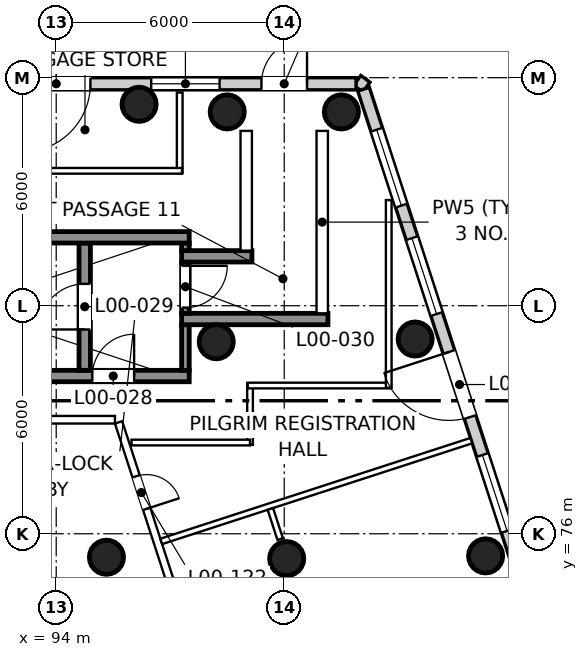
"""IFC4 building model, lengths in metres.
Left out: names, types, materials, properties, quantities, classifications, styles, units other than length and angle.
Written with IfcOpenShell. Run it as: python <this file> out.ifc"""

import sys

from ifc_helpers import new_model, si_unit, direction, frame, frame_2d, origin, origin_2d, place, context, subcontext, project, spatial, rectangle, circle, extrude, element, fill, save


model = new_model("IFC4")
c1 = context("Model", 3, precision=1e-05, world=origin(), true_north=direction((0.0, 1.0)))
c2 = subcontext(c1, "Body", "Model", "MODEL_VIEW")
j1 = project(units=[si_unit("LENGTHUNIT", "METRE"), si_unit("PLANEANGLEUNIT", "RADIAN")], contexts=[c1])
p1 = place(None, origin())
s1 = spatial("IfcSite", under=j1, at=p1, CompositionType="ELEMENT")
p2 = place(p1, origin())
s2 = spatial("IfcBuilding", under=s1, at=p2, CompositionType="ELEMENT")
p3 = place(p2, origin())
s3 = spatial("IfcBuildingStorey", under=s2, at=p3, CompositionType="ELEMENT", Elevation=0.0)
for number, where, z_axis, x_axis in (
    (1, (105.299, 75.418, 0.0), (0.0, 0.0, 1.0), (1.0, 0.0, 0.0)),
    (2, (103.445, 81.124, 0.0), (0.0, 0.0, 1.0), (1.0, 0.0, 0.0)),
    (3, (101.504, 87.1, 0.0), (0.0, 0.0, 1.0), (1.0, 0.0, 0.0)),
    (4, (98.5, 87.1, 0.0), (0.0, 0.0, 1.0), (1.0, 0.0, 0.0)),
    (5, (100.065, 75.346, 0.0), (0.0, 0.0, 1.0), (1.0, 0.0, 0.0)),
    (6, (98.211, 81.052, 0.0), (0.0, 0.0, 1.0), (1.0, 0.0, 0.0)),
    (7, (96.181, 87.3, 0.0), (0.0, 0.0, 1.0), (1.0, 0.0, 0.0)),
    (8, (95.322, 75.382, 0.0), (0.0, 0.0, 1.0), (1.0, 0.0, 0.0)),
):
    element("IfcColumn", number, at=place(p3, frame(where, z_axis=z_axis, x_axis=x_axis)), inside=s3, PredefinedType="COLUMN", context=c2, shape_type="SweptSolid", body=[
        extrude(circle(Radius=0.45, at=origin_2d()), origin(), (0.0, 0.0, 1.0), 9.0),
    ])
p4 = place(p3, frame((102.163, 87.752, 0.0), z_axis=(0.0, 0.0, 1.0), x_axis=(-0.809087927272, 0.587687609145, 0.0)))
e9 = element("IfcWall", 9, at=p4, inside=s3, PredefinedType="SOLIDWALL", context=c2, shape_type="SweptSolid", body=[
    extrude(rectangle(XDim=0.3, YDim=0.32, at=frame_2d((0.15, 0.0))), origin(), (0.0, 0.0, 1.0), 8.65),
])
p5 = place(p3, frame((110.912, 60.539, 0.0), z_axis=(0.0, 0.0, 1.0), x_axis=(-0.309016476183, 0.951056684666, 0.0)))
e10 = element("IfcWall", 10, at=p5, inside=s3, PredefinedType="SOLIDWALL", context=c2, shape_type="SweptSolid", body=[
    extrude(rectangle(XDim=28.556, YDim=0.32, at=frame_2d((14.278, 0.0))), origin(), (0.0, 0.0, 1.0), 8.65),
])
p6 = place(p5, frame((1.335, 0.0, 0.9)))
e11 = element("IfcOpeningElement", 11, at=p6, cuts=e10, PredefinedType="OPENING", context=c2, shape_type="SweptSolid", body=[
    extrude(rectangle(XDim=2.1, YDim=3.0, at=frame_2d((1.05, 1.5))), frame((0.0, 0.17, 0.0), z_axis=(0.0, -1.0, 0.0), x_axis=(1.0, 0.0, 0.0)), (0.0, 0.0, 1.0), 0.34),
])
p7 = place(p5, frame((4.335, 0.0, 0.9)))
e12 = element("IfcOpeningElement", 12, at=p7, cuts=e10, PredefinedType="OPENING", context=c2, shape_type="SweptSolid", body=[
    extrude(rectangle(XDim=2.1, YDim=3.0, at=frame_2d((1.05, 1.5))), frame((0.0, 0.17, 0.0), z_axis=(0.0, -1.0, 0.0), x_axis=(1.0, 0.0, 0.0)), (0.0, 0.0, 1.0), 0.34),
])
p8 = place(p5, frame((7.485, 0.0, 0.0)))
e13 = element("IfcOpeningElement", 13, at=p8, cuts=e10, PredefinedType="OPENING", context=c2, shape_type="SweptSolid", body=[
    extrude(rectangle(XDim=1.8, YDim=2.4, at=frame_2d((0.9, 1.2))), frame((0.0, 0.17, 0.0), z_axis=(0.0, -1.0, 0.0), x_axis=(1.0, 0.0, 0.0)), (0.0, 0.0, 1.0), 0.34),
])
p9 = place(p5, frame((10.335, 0.0, 0.9)))
e14 = element("IfcOpeningElement", 14, at=p9, cuts=e10, PredefinedType="OPENING", context=c2, shape_type="SweptSolid", body=[
    extrude(rectangle(XDim=2.1, YDim=3.0, at=frame_2d((1.05, 1.5))), frame((0.0, 0.17, 0.0), z_axis=(0.0, -1.0, 0.0), x_axis=(1.0, 0.0, 0.0)), (0.0, 0.0, 1.0), 0.34),
])
p10 = place(p5, frame((13.335, 0.0, 0.9)))
e15 = element("IfcOpeningElement", 15, at=p10, cuts=e10, PredefinedType="OPENING", context=c2, shape_type="SweptSolid", body=[
    extrude(rectangle(XDim=2.1, YDim=3.0, at=frame_2d((1.05, 1.5))), frame((0.0, 0.17, 0.0), z_axis=(0.0, -1.0, 0.0), x_axis=(1.0, 0.0, 0.0)), (0.0, 0.0, 1.0), 0.34),
])
p11 = place(p5, frame((16.335, 0.0, 0.9)))
e16 = element("IfcOpeningElement", 16, at=p11, cuts=e10, PredefinedType="OPENING", context=c2, shape_type="SweptSolid", body=[
    extrude(rectangle(XDim=2.1, YDim=3.0, at=frame_2d((1.05, 1.5))), frame((0.0, 0.17, 0.0), z_axis=(0.0, -1.0, 0.0), x_axis=(1.0, 0.0, 0.0)), (0.0, 0.0, 1.0), 0.34),
])
p12 = place(p5, frame((19.485, 0.0, 0.0)))
e17 = element("IfcOpeningElement", 17, at=p12, cuts=e10, PredefinedType="OPENING", context=c2, shape_type="SweptSolid", body=[
    extrude(rectangle(XDim=1.8, YDim=2.4, at=frame_2d((0.9, 1.2))), frame((0.0, 0.17, 0.0), z_axis=(0.0, -1.0, 0.0), x_axis=(1.0, 0.0, 0.0)), (0.0, 0.0, 1.0), 0.34),
])
p13 = place(p5, frame((22.335, 0.0, 0.9)))
e18 = element("IfcOpeningElement", 18, at=p13, cuts=e10, PredefinedType="OPENING", context=c2, shape_type="SweptSolid", body=[
    extrude(rectangle(XDim=2.1, YDim=3.0, at=frame_2d((1.05, 1.5))), frame((0.0, 0.17, 0.0), z_axis=(0.0, -1.0, 0.0), x_axis=(1.0, 0.0, 0.0)), (0.0, 0.0, 1.0), 0.34),
])
p14 = place(p5, frame((25.335, 0.0, 0.9)))
e19 = element("IfcOpeningElement", 19, at=p14, cuts=e10, PredefinedType="OPENING", context=c2, shape_type="SweptSolid", body=[
    extrude(rectangle(XDim=2.1, YDim=3.0, at=frame_2d((1.05, 1.5))), frame((0.0, 0.17, 0.0), z_axis=(0.0, -1.0, 0.0), x_axis=(1.0, 0.0, 0.0)), (0.0, 0.0, 1.0), 0.34),
])
p15 = place(p3, frame((101.891, 87.84, 0.0), z_axis=(0.0, 0.0, 1.0), x_axis=(-1.0, 0.0, 0.0)))
e20 = element("IfcWall", 20, at=p15, inside=s3, PredefinedType="SOLIDWALL", context=c2, shape_type="SweptSolid", body=[
    extrude(rectangle(XDim=20.891, YDim=0.32, at=frame_2d((10.446, 0.0))), origin(), (0.0, 0.0, 1.0), 8.65),
])
p16 = place(p15, frame((3.591, 0.0, 0.9)))
e21 = element("IfcOpeningElement", 21, at=p16, cuts=e20, PredefinedType="OPENING", context=c2, shape_type="SweptSolid", body=[
    extrude(rectangle(XDim=1.8, YDim=2.1, at=frame_2d((0.9, 1.05))), frame((0.0, 0.17, 0.0), z_axis=(0.0, -1.0, 0.0), x_axis=(1.0, 0.0, 0.0)), (0.0, 0.0, 1.0), 0.34),
])
p17 = place(p15, frame((6.991, 0.0, 0.0)))
e22 = element("IfcOpeningElement", 22, at=p17, cuts=e20, PredefinedType="OPENING", context=c2, shape_type="SweptSolid", body=[
    extrude(rectangle(XDim=1.8, YDim=2.7, at=frame_2d((0.9, 1.35))), frame((0.0, 0.17, 0.0), z_axis=(0.0, -1.0, 0.0), x_axis=(1.0, 0.0, 0.0)), (0.0, 0.0, 1.0), 0.34),
])
p18 = place(p15, frame((9.991, 0.0, 0.9)))
e23 = element("IfcOpeningElement", 23, at=p18, cuts=e20, PredefinedType="OPENING", context=c2, shape_type="SweptSolid", body=[
    extrude(rectangle(XDim=1.8, YDim=2.1, at=frame_2d((0.9, 1.05))), frame((0.0, 0.17, 0.0), z_axis=(0.0, -1.0, 0.0), x_axis=(1.0, 0.0, 0.0)), (0.0, 0.0, 1.0), 0.34),
])
p19 = place(p15, frame((12.991, 0.0, 0.9)))
e24 = element("IfcOpeningElement", 24, at=p19, cuts=e20, PredefinedType="OPENING", context=c2, shape_type="SweptSolid", body=[
    extrude(rectangle(XDim=1.8, YDim=2.1, at=frame_2d((0.9, 1.05))), frame((0.0, 0.17, 0.0), z_axis=(0.0, -1.0, 0.0), x_axis=(1.0, 0.0, 0.0)), (0.0, 0.0, 1.0), 0.34),
])
p20 = place(p15, frame((15.991, 0.0, 0.9)))
e25 = element("IfcOpeningElement", 25, at=p20, cuts=e20, PredefinedType="OPENING", context=c2, shape_type="SweptSolid", body=[
    extrude(rectangle(XDim=1.8, YDim=2.1, at=frame_2d((0.9, 1.05))), frame((0.0, 0.17, 0.0), z_axis=(0.0, -1.0, 0.0), x_axis=(1.0, 0.0, 0.0)), (0.0, 0.0, 1.0), 0.34),
])
p21 = place(p15, frame((1.291, 0.0, 0.0)))
e26 = element("IfcOpeningElement", 26, at=p21, cuts=e20, PredefinedType="OPENING", context=c2, shape_type="SweptSolid", body=[
    extrude(rectangle(XDim=1.2, YDim=2.1, at=frame_2d((0.6, 1.05))), frame((0.0, 0.17, 0.0), z_axis=(0.0, -1.0, 0.0), x_axis=(1.0, 0.0, 0.0)), (0.0, 0.0, 1.0), 0.34),
])
p22 = place(p3, frame((85.6, 80.15, 0.0), z_axis=(0.0, 0.0, 1.0), x_axis=(1.0, 0.0, 0.0)))
e27 = element("IfcWall", 27, at=p22, inside=s3, PredefinedType="SHEAR", context=c2, shape_type="SweptSolid", body=[
    extrude(rectangle(XDim=11.9, YDim=0.3, at=frame_2d((5.95, 0.0))), origin(), (0.0, 0.0, 1.0), 9.0),
])
p23 = place(p22, frame((9.35, 0.0, 0.0)))
e28 = element("IfcOpeningElement", 28, at=p23, cuts=e27, PredefinedType="OPENING", context=c2, shape_type="SweptSolid", body=[
    extrude(rectangle(XDim=1.1, YDim=2.1, at=frame_2d((0.55, 1.05))), frame((0.0, 0.16, 0.0), z_axis=(0.0, -1.0, 0.0), x_axis=(1.0, 0.0, 0.0)), (0.0, 0.0, 1.0), 0.32),
])
p24 = place(p3, frame((94.75, 80.3, 0.0), z_axis=(0.0, 0.0, 1.0), x_axis=(0.0, 1.0, 0.0)))
e29 = element("IfcWall", 29, at=p24, inside=s3, PredefinedType="SHEAR", context=c2, shape_type="SweptSolid", body=[
    extrude(rectangle(XDim=3.35, YDim=0.3, at=frame_2d((1.675, 0.0))), origin(), (0.0, 0.0, 1.0), 9.0),
])
p25 = place(p24, frame((1.075, 0.0, 0.0)))
e30 = element("IfcOpeningElement", 30, at=p25, cuts=e29, PredefinedType="OPENING", context=c2, shape_type="SweptSolid", body=[
    extrude(rectangle(XDim=1.2, YDim=2.1, at=frame_2d((0.6, 1.05))), frame((0.0, 0.16, 0.0), z_axis=(0.0, -1.0, 0.0), x_axis=(1.0, 0.0, 0.0)), (0.0, 0.0, 1.0), 0.32),
])
p26 = place(p3, frame((97.4, 80.3, 0.0), z_axis=(0.0, 0.0, 1.0), x_axis=(0.0, 1.0, 0.0)))
e31 = element("IfcWall", 31, at=p26, inside=s3, PredefinedType="SHEAR", context=c2, shape_type="SweptSolid", body=[
    extrude(rectangle(XDim=1.2, YDim=0.2, at=frame_2d((0.6, 0.0))), origin(), (0.0, 0.0, 1.0), 9.0),
])
p27 = place(p3, frame((97.3, 81.65, 0.0), z_axis=(0.0, 0.0, 1.0), x_axis=(1.0, 0.0, 0.0)))
e32 = element("IfcWall", 32, at=p27, inside=s3, PredefinedType="SHEAR", context=c2, shape_type="SweptSolid", body=[
    extrude(rectangle(XDim=3.85, YDim=0.3, at=frame_2d((1.925, 0.0))), origin(), (0.0, 0.0, 1.0), 9.0),
])
p28 = place(p3, frame((97.4, 81.8, 0.0), z_axis=(0.0, 0.0, 1.0), x_axis=(0.0, 1.0, 0.0)))
e33 = element("IfcWall", 33, at=p28, inside=s3, PredefinedType="SHEAR", context=c2, shape_type="SweptSolid", body=[
    extrude(rectangle(XDim=1.35, YDim=0.2, at=frame_2d((0.675, 0.0))), origin(), (0.0, 0.0, 1.0), 9.0),
])
p29 = place(p28, frame((0.15, 0.0, 0.0)))
e34 = element("IfcOpeningElement", 34, at=p29, cuts=e33, PredefinedType="OPENING", context=c2, shape_type="SweptSolid", body=[
    extrude(rectangle(XDim=1.1, YDim=2.1, at=frame_2d((0.55, 1.05))), frame((0.0, 0.11, 0.0), z_axis=(0.0, -1.0, 0.0), x_axis=(1.0, 0.0, 0.0)), (0.0, 0.0, 1.0), 0.22),
])
p30 = place(p3, frame((101.0, 81.8, 0.0), z_axis=(0.0, 0.0, 1.0), x_axis=(0.0, 1.0, 0.0)))
e35 = element("IfcWall", 35, at=p30, inside=s3, PredefinedType="PARTITIONING", context=c2, shape_type="SweptSolid", body=[
    extrude(rectangle(XDim=4.8, YDim=0.3, at=frame_2d((2.4, 0.0))), origin(), (0.0, 0.0, 1.0), 8.65),
])
p31 = place(p3, frame((97.3, 83.3, 0.0), z_axis=(0.0, 0.0, 1.0), x_axis=(1.0, 0.0, 0.0)))
e36 = element("IfcWall", 36, at=p31, inside=s3, PredefinedType="SHEAR", context=c2, shape_type="SweptSolid", body=[
    extrude(rectangle(XDim=1.85, YDim=0.3, at=frame_2d((0.925, 0.0))), origin(), (0.0, 0.0, 1.0), 9.0),
])
p32 = place(p3, frame((97.3, 83.55, 0.0), z_axis=(0.0, 0.0, 1.0), x_axis=(1.0, 0.0, 0.0)))
e37 = element("IfcWall", 37, at=p32, inside=s3, PredefinedType="SHEAR", context=c2, shape_type="SweptSolid", body=[
    extrude(rectangle(XDim=0.2, YDim=0.2, at=frame_2d((0.1, 0.0))), origin(), (0.0, 0.0, 1.0), 9.0),
])
p33 = place(p3, frame((99.0, 83.45, 0.0), z_axis=(0.0, 0.0, 1.0), x_axis=(0.0, 1.0, 0.0)))
e38 = element("IfcWall", 38, at=p33, inside=s3, PredefinedType="PARTITIONING", context=c2, shape_type="SweptSolid", body=[
    extrude(rectangle(XDim=3.15, YDim=0.3, at=frame_2d((1.575, 0.0))), origin(), (0.0, 0.0, 1.0), 8.65),
])
p34 = place(p3, frame((85.6, 83.8, 0.0), z_axis=(0.0, 0.0, 1.0), x_axis=(1.0, 0.0, 0.0)))
e39 = element("IfcWall", 39, at=p34, inside=s3, PredefinedType="SHEAR", context=c2, shape_type="SweptSolid", body=[
    extrude(rectangle(XDim=11.9, YDim=0.3, at=frame_2d((5.95, 0.0))), origin(), (0.0, 0.0, 1.0), 9.0),
])
p35 = place(p3, frame((83.2, 79.0, 0.0), z_axis=(0.0, 0.0, 1.0), x_axis=(1.0, 0.0, 0.0)))
e40 = element("IfcWall", 40, at=p35, inside=s3, PredefinedType="PARTITIONING", context=c2, shape_type="SweptSolid", body=[
    extrude(rectangle(XDim=12.346, YDim=0.2, at=frame_2d((6.173, 0.0))), origin(), (0.0, 0.0, 1.0), 7.95),
])
p36 = place(p3, frame((95.641, 78.931, 0.0), z_axis=(0.0, 0.0, 1.0), x_axis=(0.309013160516, -0.951057761983, 0.0)))
e41 = element("IfcWall", 41, at=p36, inside=s3, PredefinedType="PARTITIONING", context=c2, shape_type="SweptSolid", body=[
    extrude(rectangle(XDim=17.717, YDim=0.2, at=frame_2d((8.859, 0.0))), origin(), (0.0, 0.0, 1.0), 8.65),
])
p37 = place(p36, frame((13.799, 0.0, 0.0)))
e42 = element("IfcOpeningElement", 42, at=p37, cuts=e41, PredefinedType="OPENING", context=c2, shape_type="SweptSolid", body=[
    extrude(rectangle(XDim=0.9, YDim=2.1, at=frame_2d((0.45, 1.05))), frame((0.0, 0.11, 0.0), z_axis=(0.0, -1.0, 0.0), x_axis=(1.0, 0.0, 0.0)), (0.0, 0.0, 1.0), 0.22),
])
p38 = place(p36, frame((10.375, 0.0, 0.0)))
e43 = element("IfcOpeningElement", 43, at=p38, cuts=e41, PredefinedType="OPENING", context=c2, shape_type="SweptSolid", body=[
    extrude(rectangle(XDim=0.9, YDim=2.1, at=frame_2d((0.45, 1.05))), frame((0.0, 0.11, 0.0), z_axis=(0.0, -1.0, 0.0), x_axis=(1.0, 0.0, 0.0)), (0.0, 0.0, 1.0), 0.22),
])
p39 = place(p36, frame((5.875, 0.0, 0.0)))
e44 = element("IfcOpeningElement", 44, at=p39, cuts=e41, PredefinedType="OPENING", context=c2, shape_type="SweptSolid", body=[
    extrude(rectangle(XDim=0.9, YDim=2.1, at=frame_2d((0.45, 1.05))), frame((0.0, 0.11, 0.0), z_axis=(0.0, -1.0, 0.0), x_axis=(1.0, 0.0, 0.0)), (0.0, 0.0, 1.0), 0.22),
])
p40 = place(p36, frame((1.492, 0.0, 0.0)))
e45 = element("IfcOpeningElement", 45, at=p40, cuts=e41, PredefinedType="OPENING", context=c2, shape_type="SweptSolid", body=[
    extrude(rectangle(XDim=0.9, YDim=2.1, at=frame_2d((0.45, 1.05))), frame((0.0, 0.11, 0.0), z_axis=(0.0, -1.0, 0.0), x_axis=(1.0, 0.0, 0.0)), (0.0, 0.0, 1.0), 0.22),
])
p41 = place(p3, frame((104.924, 78.45, 0.0), z_axis=(0.0, 0.0, 1.0), x_axis=(-0.951054768527, -0.309022373402, 0.0)))
e46 = element("IfcWall", 46, at=p41, inside=s3, PredefinedType="PARTITIONING", context=c2, shape_type="SweptSolid", body=[
    extrude(rectangle(XDim=8.58, YDim=0.15, at=frame_2d((4.29, 0.0))), origin(), (0.0, 0.0, 1.0), 7.95),
])
p42 = place(p3, frame((99.894, 75.858, 0.0), z_axis=(0.0, 0.0, 1.0), x_axis=(-0.308947409325, 0.951079123034, 0.0)))
e47 = element("IfcWall", 47, at=p42, inside=s3, PredefinedType="PARTITIONING", context=c2, shape_type="SweptSolid", body=[
    extrude(rectangle(XDim=0.836, YDim=0.15, at=frame_2d((0.418, 0.0))), origin(), (0.0, 0.0, 1.0), 7.95),
])
p43 = place(p3, frame((97.25, 87.61, 0.0), z_axis=(0.0, 0.0, 1.0), x_axis=(0.0, -1.0, 0.0)))
e48 = element("IfcWall", 48, at=p43, inside=s3, PredefinedType="PARTITIONING", context=c2, shape_type="SweptSolid", body=[
    extrude(rectangle(XDim=2.12, YDim=0.15, at=frame_2d((1.06, 0.0))), origin(), (0.0, 0.0, 1.0), 8.65),
])
p44 = place(p3, frame((97.31, 85.55, 0.0), z_axis=(0.0, 0.0, 1.0), x_axis=(-1.0, 0.0, 0.0)))
e49 = element("IfcWall", 49, at=p44, inside=s3, PredefinedType="PARTITIONING", context=c2, shape_type="SweptSolid", body=[
    extrude(rectangle(XDim=13.37, YDim=0.15, at=frame_2d((6.685, 0.0))), origin(), (0.0, 0.0, 1.0), 7.95),
])
p45 = place(p3, frame((99.1, 78.34, 0.0), z_axis=(0.0, 0.0, 1.0), x_axis=(0.0, 1.0, 0.0)))
e50 = element("IfcWall", 50, at=p45, inside=s3, PredefinedType="PARTITIONING", context=c2, shape_type="SweptSolid", body=[
    extrude(rectangle(XDim=1.62, YDim=0.15, at=frame_2d((0.81, 0.0))), origin(), (0.0, 0.0, 1.0), 7.95),
])
p46 = place(p3, frame((99.04, 79.9, 0.0), z_axis=(0.0, 0.0, 1.0), x_axis=(1.0, 0.0, 0.0)))
e51 = element("IfcWall", 51, at=p46, inside=s3, PredefinedType="PARTITIONING", context=c2, shape_type="SweptSolid", body=[
    extrude(rectangle(XDim=3.77, YDim=0.15, at=frame_2d((1.885, 0.0))), origin(), (0.0, 0.0, 1.0), 8.65),
])
p47 = place(p3, frame((102.75, 79.84, 0.0), z_axis=(0.0, 0.0, 1.0), x_axis=(0.0, 1.0, 0.0)))
e52 = element("IfcWall", 52, at=p47, inside=s3, PredefinedType="PARTITIONING", context=c2, shape_type="SweptSolid", body=[
    extrude(rectangle(XDim=4.94, YDim=0.15, at=frame_2d((2.47, 0.0))), origin(), (0.0, 0.0, 1.0), 7.95),
])
p48 = place(p3, frame((95.982, 78.4, 0.0), z_axis=(0.0, 0.0, 1.0), x_axis=(1.0, 0.0, 0.0)))
e53 = element("IfcWall", 53, at=p48, inside=s3, PredefinedType="PARTITIONING", context=c2, shape_type="SweptSolid", body=[
    extrude(rectangle(XDim=3.118, YDim=0.15, at=frame_2d((1.559, 0.0))), origin(), (0.0, 0.0, 1.0), 7.95),
])
p49 = place(p11, origin())
e54 = element("IfcWindow", 54, at=p49, inside=s3, PartitioningType="SINGLE_PANEL", PredefinedType="WINDOW", context=c2, shape_type="SweptSolid", body=[
    extrude(rectangle(XDim=2.1, YDim=3.0, at=frame_2d((1.05, 1.5))), frame((0.0, 0.07, 0.0), z_axis=(0.0, -1.0, 0.0), x_axis=(1.0, 0.0, 0.0)), (0.0, 0.0, 1.0), 0.06),
])
fill(e16, e54)
p50 = place(p12, origin())
e55 = element("IfcDoor", 55, at=p50, inside=s3, OperationType="DOUBLE_DOOR_DOUBLE_SWING", PredefinedType="DOOR", context=c2, shape_type="SweptSolid", body=[
    extrude(rectangle(XDim=1.8, YDim=2.4, at=frame_2d((0.9, 1.2))), frame((0.0, 0.04, 0.0), z_axis=(0.0, -1.0, 0.0), x_axis=(1.0, 0.0, 0.0)), (0.0, 0.0, 1.0), 0.05),
])
fill(e17, e55)
p51 = place(p13, origin())
e56 = element("IfcWindow", 56, at=p51, inside=s3, PartitioningType="SINGLE_PANEL", PredefinedType="WINDOW", context=c2, shape_type="SweptSolid", body=[
    extrude(rectangle(XDim=2.1, YDim=3.0, at=frame_2d((1.05, 1.5))), frame((0.0, 0.07, 0.0), z_axis=(0.0, -1.0, 0.0), x_axis=(1.0, 0.0, 0.0)), (0.0, 0.0, 1.0), 0.06),
])
fill(e18, e56)
p52 = place(p14, origin())
e57 = element("IfcWindow", 57, at=p52, inside=s3, PartitioningType="SINGLE_PANEL", PredefinedType="WINDOW", context=c2, shape_type="SweptSolid", body=[
    extrude(rectangle(XDim=2.1, YDim=3.0, at=frame_2d((1.05, 1.5))), frame((0.0, 0.07, 0.0), z_axis=(0.0, -1.0, 0.0), x_axis=(1.0, 0.0, 0.0)), (0.0, 0.0, 1.0), 0.06),
])
fill(e19, e57)
p53 = place(p16, origin())
e58 = element("IfcWindow", 58, at=p53, inside=s3, PartitioningType="SINGLE_PANEL", PredefinedType="WINDOW", context=c2, shape_type="SweptSolid", body=[
    extrude(rectangle(XDim=1.8, YDim=2.1, at=frame_2d((0.9, 1.05))), frame((0.0, 0.07, 0.0), z_axis=(0.0, -1.0, 0.0), x_axis=(1.0, 0.0, 0.0)), (0.0, 0.0, 1.0), 0.06),
])
fill(e21, e58)
p54 = place(p17, origin())
e59 = element("IfcDoor", 59, at=p54, inside=s3, OperationType="DOUBLE_DOOR_DOUBLE_SWING", PredefinedType="DOOR", context=c2, shape_type="SweptSolid", body=[
    extrude(rectangle(XDim=1.8, YDim=2.7, at=frame_2d((0.9, 1.35))), frame((0.0, 0.04, 0.0), z_axis=(0.0, -1.0, 0.0), x_axis=(1.0, 0.0, 0.0)), (0.0, 0.0, 1.0), 0.05),
])
fill(e22, e59)
p55 = place(p21, frame((1.2, 0.0, 0.0), z_axis=(0.0, 0.0, 1.0), x_axis=(-1.0, 0.0, 0.0)))
e60 = element("IfcDoor", 60, at=p55, inside=s3, OperationType="SINGLE_SWING_RIGHT", PredefinedType="DOOR", context=c2, shape_type="SweptSolid", body=[
    extrude(rectangle(XDim=1.2, YDim=2.1, at=frame_2d((0.6, 1.05))), frame((0.0, 0.04, 0.0), z_axis=(0.0, -1.0, 0.0), x_axis=(1.0, 0.0, 0.0)), (0.0, 0.0, 1.0), 0.05),
])
fill(e26, e60)
p56 = place(p23, origin())
e61 = element("IfcDoor", 61, at=p56, inside=s3, OperationType="SINGLE_SWING_RIGHT", PredefinedType="DOOR", context=c2, shape_type="SweptSolid", body=[
    extrude(rectangle(XDim=1.1, YDim=2.1, at=frame_2d((0.55, 1.05))), frame((0.0, 0.025, 0.0), z_axis=(0.0, -1.0, 0.0), x_axis=(1.0, 0.0, 0.0)), (0.0, 0.0, 1.0), 0.05),
])
fill(e28, e61)
p57 = place(p25, origin())
e62 = element("IfcDoor", 62, at=p57, inside=s3, OperationType="SINGLE_SWING_LEFT", PredefinedType="DOOR", context=c2, shape_type="SweptSolid", body=[
    extrude(rectangle(XDim=1.2, YDim=2.1, at=frame_2d((0.6, 1.05))), frame((0.0, 0.025, 0.0), z_axis=(0.0, -1.0, 0.0), x_axis=(1.0, 0.0, 0.0)), (0.0, 0.0, 1.0), 0.05),
])
fill(e30, e62)
p58 = place(p29, frame((1.1, 0.0, 0.0), z_axis=(0.0, 0.0, 1.0), x_axis=(-1.0, 0.0, 0.0)))
e63 = element("IfcDoor", 63, at=p58, inside=s3, OperationType="SINGLE_SWING_LEFT", PredefinedType="DOOR", context=c2, shape_type="SweptSolid", body=[
    extrude(rectangle(XDim=1.1, YDim=2.1, at=frame_2d((0.55, 1.05))), frame((0.0, 0.025, 0.0), z_axis=(0.0, -1.0, 0.0), x_axis=(1.0, 0.0, 0.0)), (0.0, 0.0, 1.0), 0.05),
])
fill(e34, e63)
p59 = place(p40, origin())
e64 = element("IfcDoor", 64, at=p59, inside=s3, OperationType="SINGLE_SWING_RIGHT", PredefinedType="DOOR", context=c2, shape_type="SweptSolid", body=[
    extrude(rectangle(XDim=0.9, YDim=2.1, at=frame_2d((0.45, 1.05))), frame((0.0, 0.025, 0.0), z_axis=(0.0, -1.0, 0.0), x_axis=(1.0, 0.0, 0.0)), (0.0, 0.0, 1.0), 0.05),
])
fill(e45, e64)
save(model, sys.argv[1])
